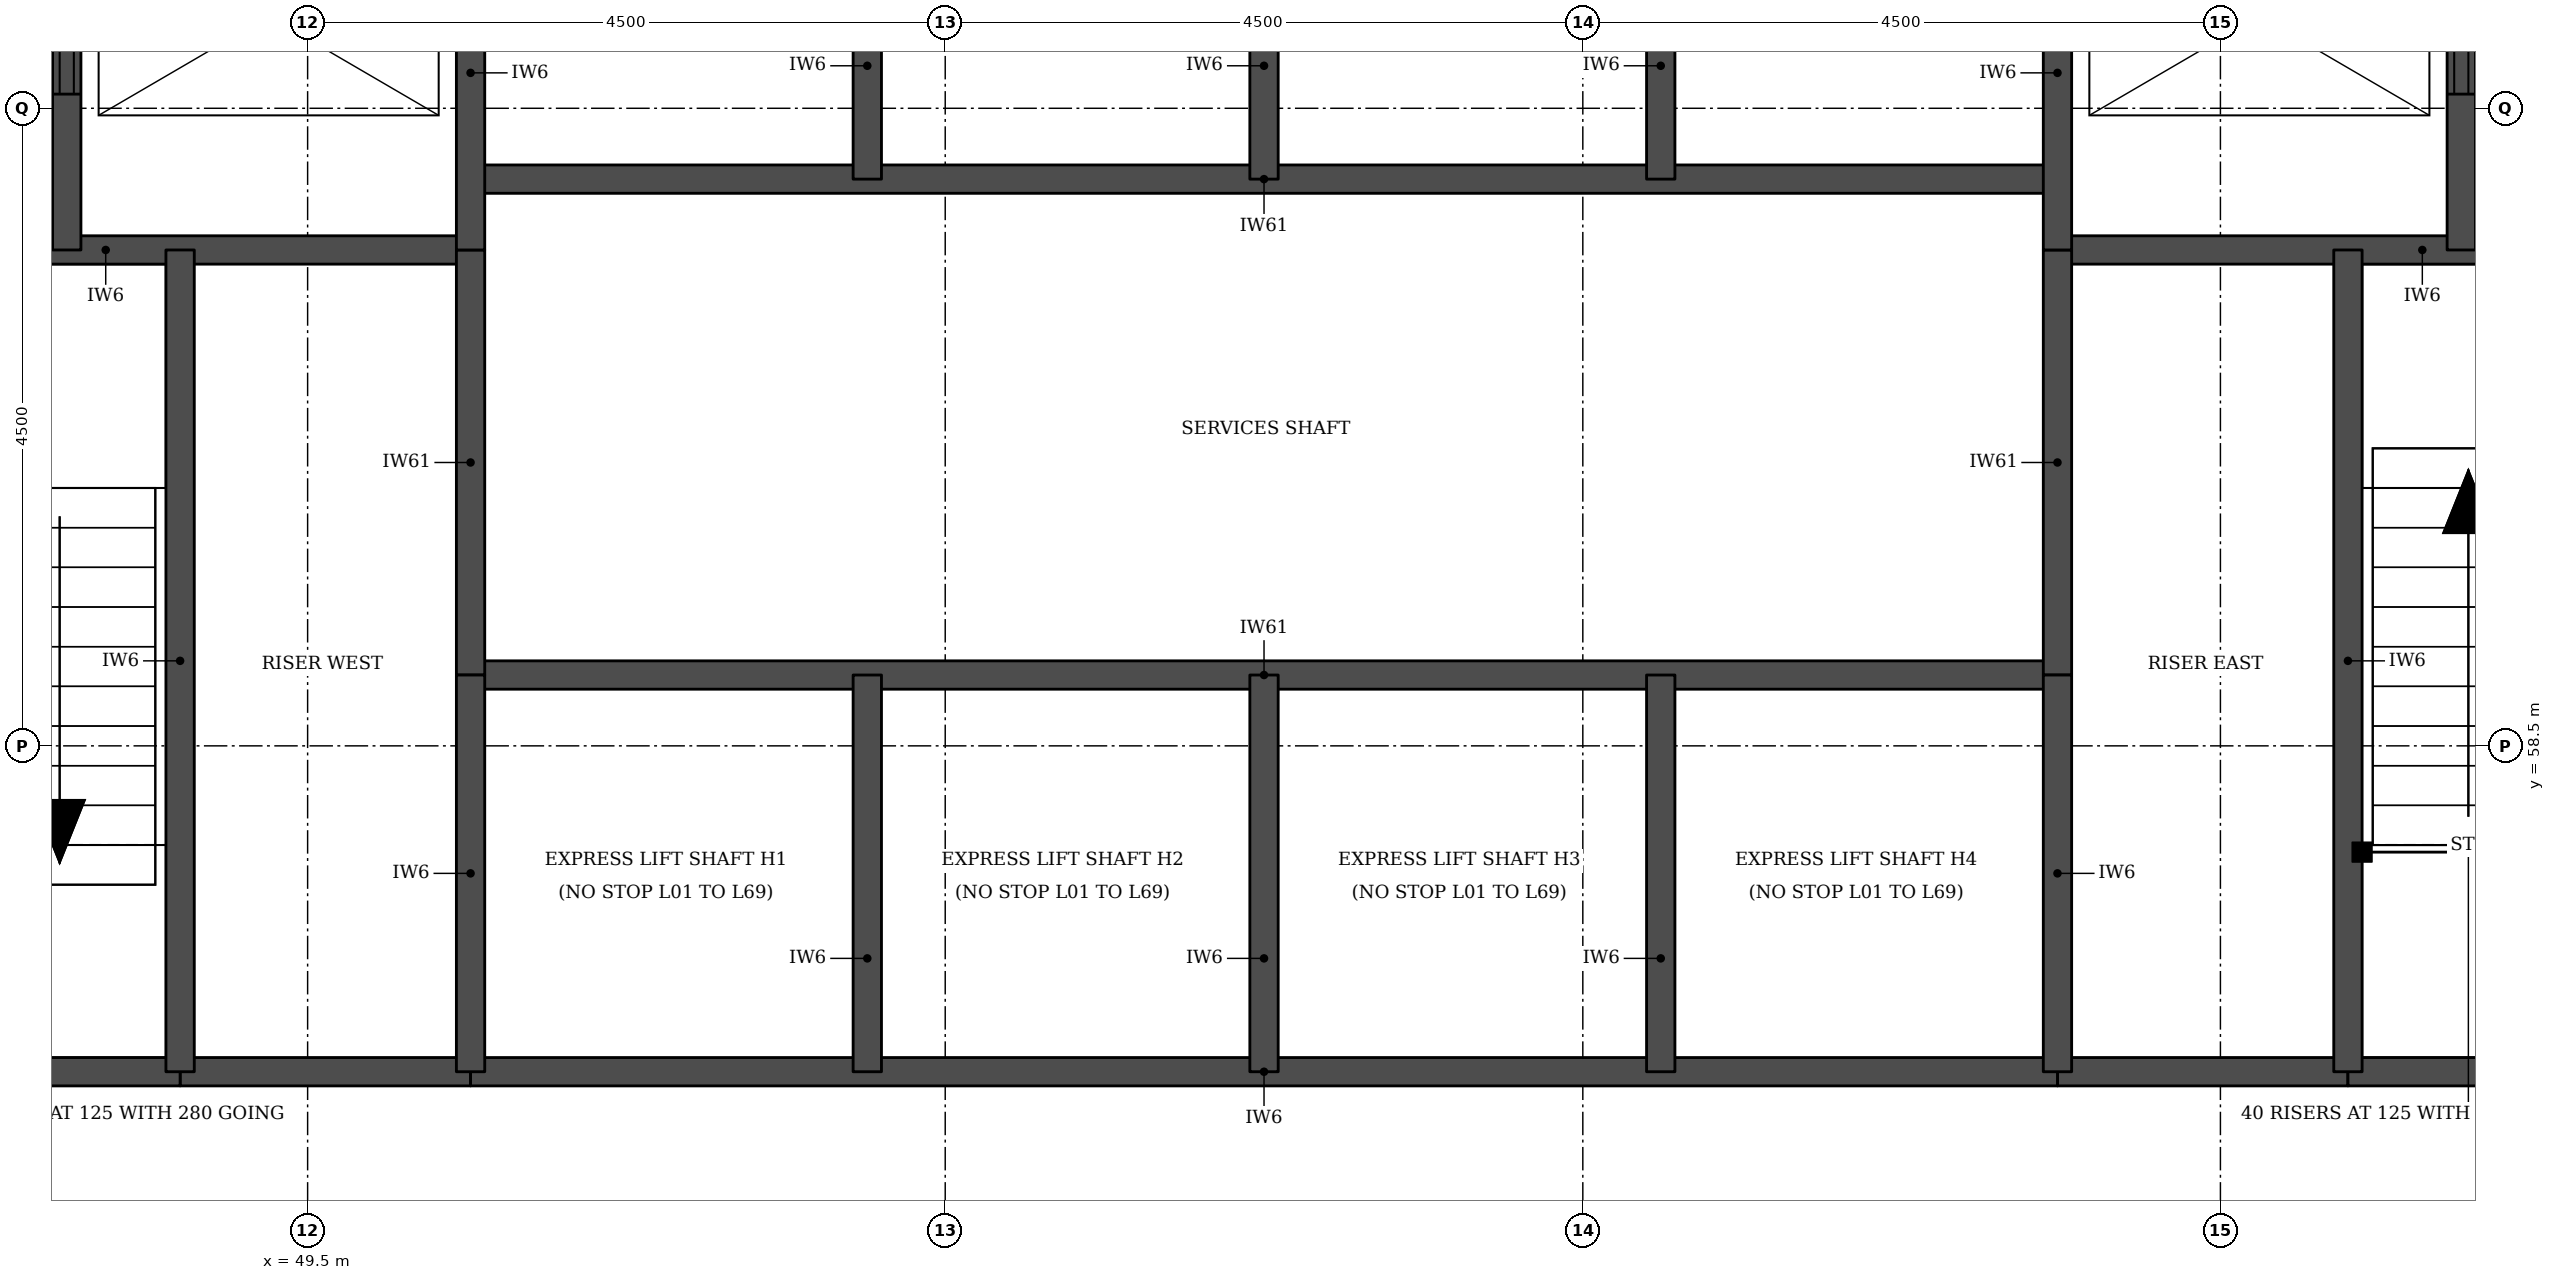
"""IFC4 building model, lengths in metres.
Left out: names, types, materials, properties, quantities, classifications, styles, units other than length and angle.
Written with IfcOpenShell. Run it as: python <this file> out.ifc"""

import sys

from ifc_helpers import new_model, si_unit, direction, frame, frame_2d, origin, place, context, subcontext, project, spatial, rectangle, extrude, element, fill, save


model = new_model("IFC4")
c1 = context("Model", 3, precision=1e-05, world=origin(), true_north=direction((0.0, 1.0)))
c2 = subcontext(c1, "Body", "Model", "MODEL_VIEW")
j1 = project(units=[si_unit("LENGTHUNIT", "METRE"), si_unit("PLANEANGLEUNIT", "RADIAN")], contexts=[c1])
p1 = place(None, origin())
s1 = spatial("IfcSite", under=j1, at=p1, CompositionType="ELEMENT")
p2 = place(p1, origin())
s2 = spatial("IfcBuilding", under=s1, at=p2, CompositionType="ELEMENT")
p3 = place(p2, frame((0.0, 0.0, 69.3)))
s3 = spatial("IfcBuildingStorey", under=s2, at=p3, CompositionType="ELEMENT", Elevation=69.3)
for number, where, z_axis, x_axis in (
    (1, (48.6, 56.2, 0.0), (0.0, 0.0, 1.0), (1.0, 0.0, 0.0)),
    (2, (61.85, 56.2, 0.0), (0.0, 0.0, 1.0), (1.0, 0.0, 0.0)),
):
    element("IfcWall", number, at=place(p3, frame(where, z_axis=z_axis, x_axis=x_axis)), inside=s3, PredefinedType="SOLIDWALL", context=c2, shape_type="SweptSolid", body=[
        extrude(rectangle(XDim=2.05, YDim=0.2, at=frame_2d((1.025, 0.0))), origin(), (0.0, 0.0, 1.0), 4.85),
    ])
p4 = place(p3, frame((45.5, 56.2, 0.0), z_axis=(0.0, 0.0, 1.0), x_axis=(1.0, 0.0, 0.0)))
e3 = element("IfcWall", 3, at=p4, inside=s3, PredefinedType="SOLIDWALL", context=c2, shape_type="SweptSolid", body=[
    extrude(rectangle(XDim=3.1, YDim=0.2, at=frame_2d((1.55, 0.0))), origin(), (0.0, 0.0, 1.0), 4.85),
])
p5 = place(p3, frame((50.65, 56.2, 0.0), z_axis=(0.0, 0.0, 1.0), x_axis=(1.0, 0.0, 0.0)))
e4 = element("IfcWall", 4, at=p5, inside=s3, PredefinedType="SOLIDWALL", context=c2, shape_type="SweptSolid", body=[
    extrude(rectangle(XDim=11.2, YDim=0.2, at=frame_2d((5.6, 0.0))), origin(), (0.0, 0.0, 1.0), 4.85),
])
p6 = place(p3, frame((63.9, 56.2, 0.0), z_axis=(0.0, 0.0, 1.0), x_axis=(1.0, 0.0, 0.0)))
e5 = element("IfcWall", 5, at=p6, inside=s3, PredefinedType="SOLIDWALL", context=c2, shape_type="SweptSolid", body=[
    extrude(rectangle(XDim=3.1, YDim=0.2, at=frame_2d((1.55, 0.0))), origin(), (0.0, 0.0, 1.0), 4.85),
])
p7 = place(p3, frame((50.65, 59.0, 0.0), z_axis=(0.0, 0.0, 1.0), x_axis=(1.0, 0.0, 0.0)))
e6 = element("IfcWall", 6, at=p7, inside=s3, PredefinedType="SOLIDWALL", context=c2, shape_type="SweptSolid", body=[
    extrude(rectangle(XDim=11.2, YDim=0.2, at=frame_2d((5.6, 0.0))), origin(), (0.0, 0.0, 1.0), 5.0),
])
for number, where, z_axis, x_axis in (
    (7, (45.5, 62.0, 0.0), (0.0, 0.0, 1.0), (1.0, 0.0, 0.0)),
    (8, (61.85, 62.0, 0.0), (0.0, 0.0, 1.0), (1.0, 0.0, 0.0)),
):
    element("IfcWall", number, at=place(p3, frame(where, z_axis=z_axis, x_axis=x_axis)), inside=s3, PredefinedType="SOLIDWALL", context=c2, shape_type="SweptSolid", body=[
        extrude(rectangle(XDim=5.15, YDim=0.2, at=frame_2d((2.575, 0.0))), origin(), (0.0, 0.0, 1.0), 4.85),
    ])
p8 = place(p3, frame((50.65, 62.5, 0.0), z_axis=(0.0, 0.0, 1.0), x_axis=(1.0, 0.0, 0.0)))
e9 = element("IfcWall", 9, at=p8, inside=s3, PredefinedType="SOLIDWALL", context=c2, shape_type="SweptSolid", body=[
    extrude(rectangle(XDim=11.2, YDim=0.2, at=frame_2d((5.6, 0.0))), origin(), (0.0, 0.0, 1.0), 5.0),
])
p9 = place(p3, frame((47.8, 62.0, 0.0), z_axis=(0.0, 0.0, 1.0), x_axis=(0.0, 1.0, 0.0)))
e10 = element("IfcWall", 10, at=p9, inside=s3, PredefinedType="SOLIDWALL", context=c2, shape_type="SweptSolid", body=[
    extrude(rectangle(XDim=3.3, YDim=0.2, at=frame_2d((1.65, 0.0))), origin(), (0.0, 0.0, 1.0), 4.85),
])
p10 = place(p9, frame((1.1, 0.0, 0.0)))
e11 = element("IfcOpeningElement", 11, at=p10, cuts=e10, PredefinedType="OPENING", context=c2, shape_type="SweptSolid", body=[
    extrude(rectangle(XDim=1.1, YDim=2.1, at=frame_2d((0.55, 1.05))), frame((0.0, 0.11, 0.0), z_axis=(0.0, -1.0, 0.0), x_axis=(1.0, 0.0, 0.0)), (0.0, 0.0, 1.0), 0.22),
])
p11 = place(p3, frame((48.6, 56.2, 0.0), z_axis=(0.0, 0.0, 1.0), x_axis=(0.0, 1.0, 0.0)))
e12 = element("IfcWall", 12, at=p11, inside=s3, PredefinedType="SOLIDWALL", context=c2, shape_type="SweptSolid", body=[
    extrude(rectangle(XDim=5.8, YDim=0.2, at=frame_2d((2.9, 0.0))), origin(), (0.0, 0.0, 1.0), 4.85),
])
p12 = place(p3, frame((50.65, 59.0, 0.0), z_axis=(0.0, 0.0, 1.0), x_axis=(0.0, 1.0, 0.0)))
e13 = element("IfcWall", 13, at=p12, inside=s3, PredefinedType="SOLIDWALL", context=c2, shape_type="SweptSolid", body=[
    extrude(rectangle(XDim=3.0, YDim=0.2, at=frame_2d((1.5, 0.0))), origin(), (0.0, 0.0, 1.0), 5.0),
])
p13 = place(p3, frame((50.65, 56.2, 0.0), z_axis=(0.0, 0.0, 1.0), x_axis=(0.0, 1.0, 0.0)))
e14 = element("IfcWall", 14, at=p13, inside=s3, PredefinedType="SOLIDWALL", context=c2, shape_type="SweptSolid", body=[
    extrude(rectangle(XDim=2.8, YDim=0.2, at=frame_2d((1.4, 0.0))), origin(), (0.0, 0.0, 1.0), 4.85),
])
p14 = place(p3, frame((50.65, 62.0, 0.0), z_axis=(0.0, 0.0, 1.0), x_axis=(0.0, 1.0, 0.0)))
e15 = element("IfcWall", 15, at=p14, inside=s3, PredefinedType="SOLIDWALL", context=c2, shape_type="SweptSolid", body=[
    extrude(rectangle(XDim=3.3, YDim=0.2, at=frame_2d((1.65, 0.0))), origin(), (0.0, 0.0, 1.0), 4.85),
])
for number, where, z_axis, x_axis in (
    (16, (53.45, 56.2, 0.0), (0.0, 0.0, 1.0), (0.0, 1.0, 0.0)),
    (17, (53.45, 62.5, 0.0), (0.0, 0.0, 1.0), (0.0, 1.0, 0.0)),
    (18, (56.25, 56.2, 0.0), (0.0, 0.0, 1.0), (0.0, 1.0, 0.0)),
    (19, (56.25, 62.5, 0.0), (0.0, 0.0, 1.0), (0.0, 1.0, 0.0)),
    (20, (59.05, 56.2, 0.0), (0.0, 0.0, 1.0), (0.0, 1.0, 0.0)),
    (21, (59.05, 62.5, 0.0), (0.0, 0.0, 1.0), (0.0, 1.0, 0.0)),
):
    element("IfcWall", number, at=place(p3, frame(where, z_axis=z_axis, x_axis=x_axis)), inside=s3, PredefinedType="SOLIDWALL", context=c2, shape_type="SweptSolid", body=[
        extrude(rectangle(XDim=2.8, YDim=0.2, at=frame_2d((1.4, 0.0))), origin(), (0.0, 0.0, 1.0), 4.85),
    ])
p15 = place(p3, frame((61.85, 59.0, 0.0), z_axis=(0.0, 0.0, 1.0), x_axis=(0.0, 1.0, 0.0)))
e22 = element("IfcWall", 22, at=p15, inside=s3, PredefinedType="SOLIDWALL", context=c2, shape_type="SweptSolid", body=[
    extrude(rectangle(XDim=3.0, YDim=0.2, at=frame_2d((1.5, 0.0))), origin(), (0.0, 0.0, 1.0), 5.0),
])
p16 = place(p3, frame((61.85, 56.2, 0.0), z_axis=(0.0, 0.0, 1.0), x_axis=(0.0, 1.0, 0.0)))
e23 = element("IfcWall", 23, at=p16, inside=s3, PredefinedType="SOLIDWALL", context=c2, shape_type="SweptSolid", body=[
    extrude(rectangle(XDim=2.8, YDim=0.2, at=frame_2d((1.4, 0.0))), origin(), (0.0, 0.0, 1.0), 4.85),
])
p17 = place(p3, frame((61.85, 62.0, 0.0), z_axis=(0.0, 0.0, 1.0), x_axis=(0.0, 1.0, 0.0)))
e24 = element("IfcWall", 24, at=p17, inside=s3, PredefinedType="SOLIDWALL", context=c2, shape_type="SweptSolid", body=[
    extrude(rectangle(XDim=3.3, YDim=0.2, at=frame_2d((1.65, 0.0))), origin(), (0.0, 0.0, 1.0), 4.85),
])
p18 = place(p3, frame((63.9, 56.2, 0.0), z_axis=(0.0, 0.0, 1.0), x_axis=(0.0, 1.0, 0.0)))
e25 = element("IfcWall", 25, at=p18, inside=s3, PredefinedType="SOLIDWALL", context=c2, shape_type="SweptSolid", body=[
    extrude(rectangle(XDim=5.8, YDim=0.2, at=frame_2d((2.9, 0.0))), origin(), (0.0, 0.0, 1.0), 4.85),
])
p19 = place(p3, frame((64.7, 62.0, 0.0), z_axis=(0.0, 0.0, 1.0), x_axis=(0.0, 1.0, 0.0)))
e26 = element("IfcWall", 26, at=p19, inside=s3, PredefinedType="SOLIDWALL", context=c2, shape_type="SweptSolid", body=[
    extrude(rectangle(XDim=3.3, YDim=0.2, at=frame_2d((1.65, 0.0))), origin(), (0.0, 0.0, 1.0), 4.85),
])
p20 = place(p19, frame((1.1, 0.0, 0.0)))
e27 = element("IfcOpeningElement", 27, at=p20, cuts=e26, PredefinedType="OPENING", context=c2, shape_type="SweptSolid", body=[
    extrude(rectangle(XDim=1.1, YDim=2.1, at=frame_2d((0.55, 1.05))), frame((0.0, 0.11, 0.0), z_axis=(0.0, -1.0, 0.0), x_axis=(1.0, 0.0, 0.0)), (0.0, 0.0, 1.0), 0.22),
])
p21 = place(p10, origin())
e28 = element("IfcDoor", 28, at=p21, inside=s3, OperationType="DOUBLE_DOOR_SLIDING", PredefinedType="DOOR", context=c2, shape_type="SweptSolid", body=[
    extrude(rectangle(XDim=1.1, YDim=2.1, at=frame_2d((0.55, 1.05))), frame((0.0, 0.025, 0.0), z_axis=(0.0, -1.0, 0.0), x_axis=(1.0, 0.0, 0.0)), (0.0, 0.0, 1.0), 0.05),
])
fill(e11, e28)
p22 = place(p20, origin())
e29 = element("IfcDoor", 29, at=p22, inside=s3, OperationType="DOUBLE_DOOR_SLIDING", PredefinedType="DOOR", context=c2, shape_type="SweptSolid", body=[
    extrude(rectangle(XDim=1.1, YDim=2.1, at=frame_2d((0.55, 1.05))), frame((0.0, 0.025, 0.0), z_axis=(0.0, -1.0, 0.0), x_axis=(1.0, 0.0, 0.0)), (0.0, 0.0, 1.0), 0.05),
])
fill(e27, e29)
save(model, sys.argv[1])
